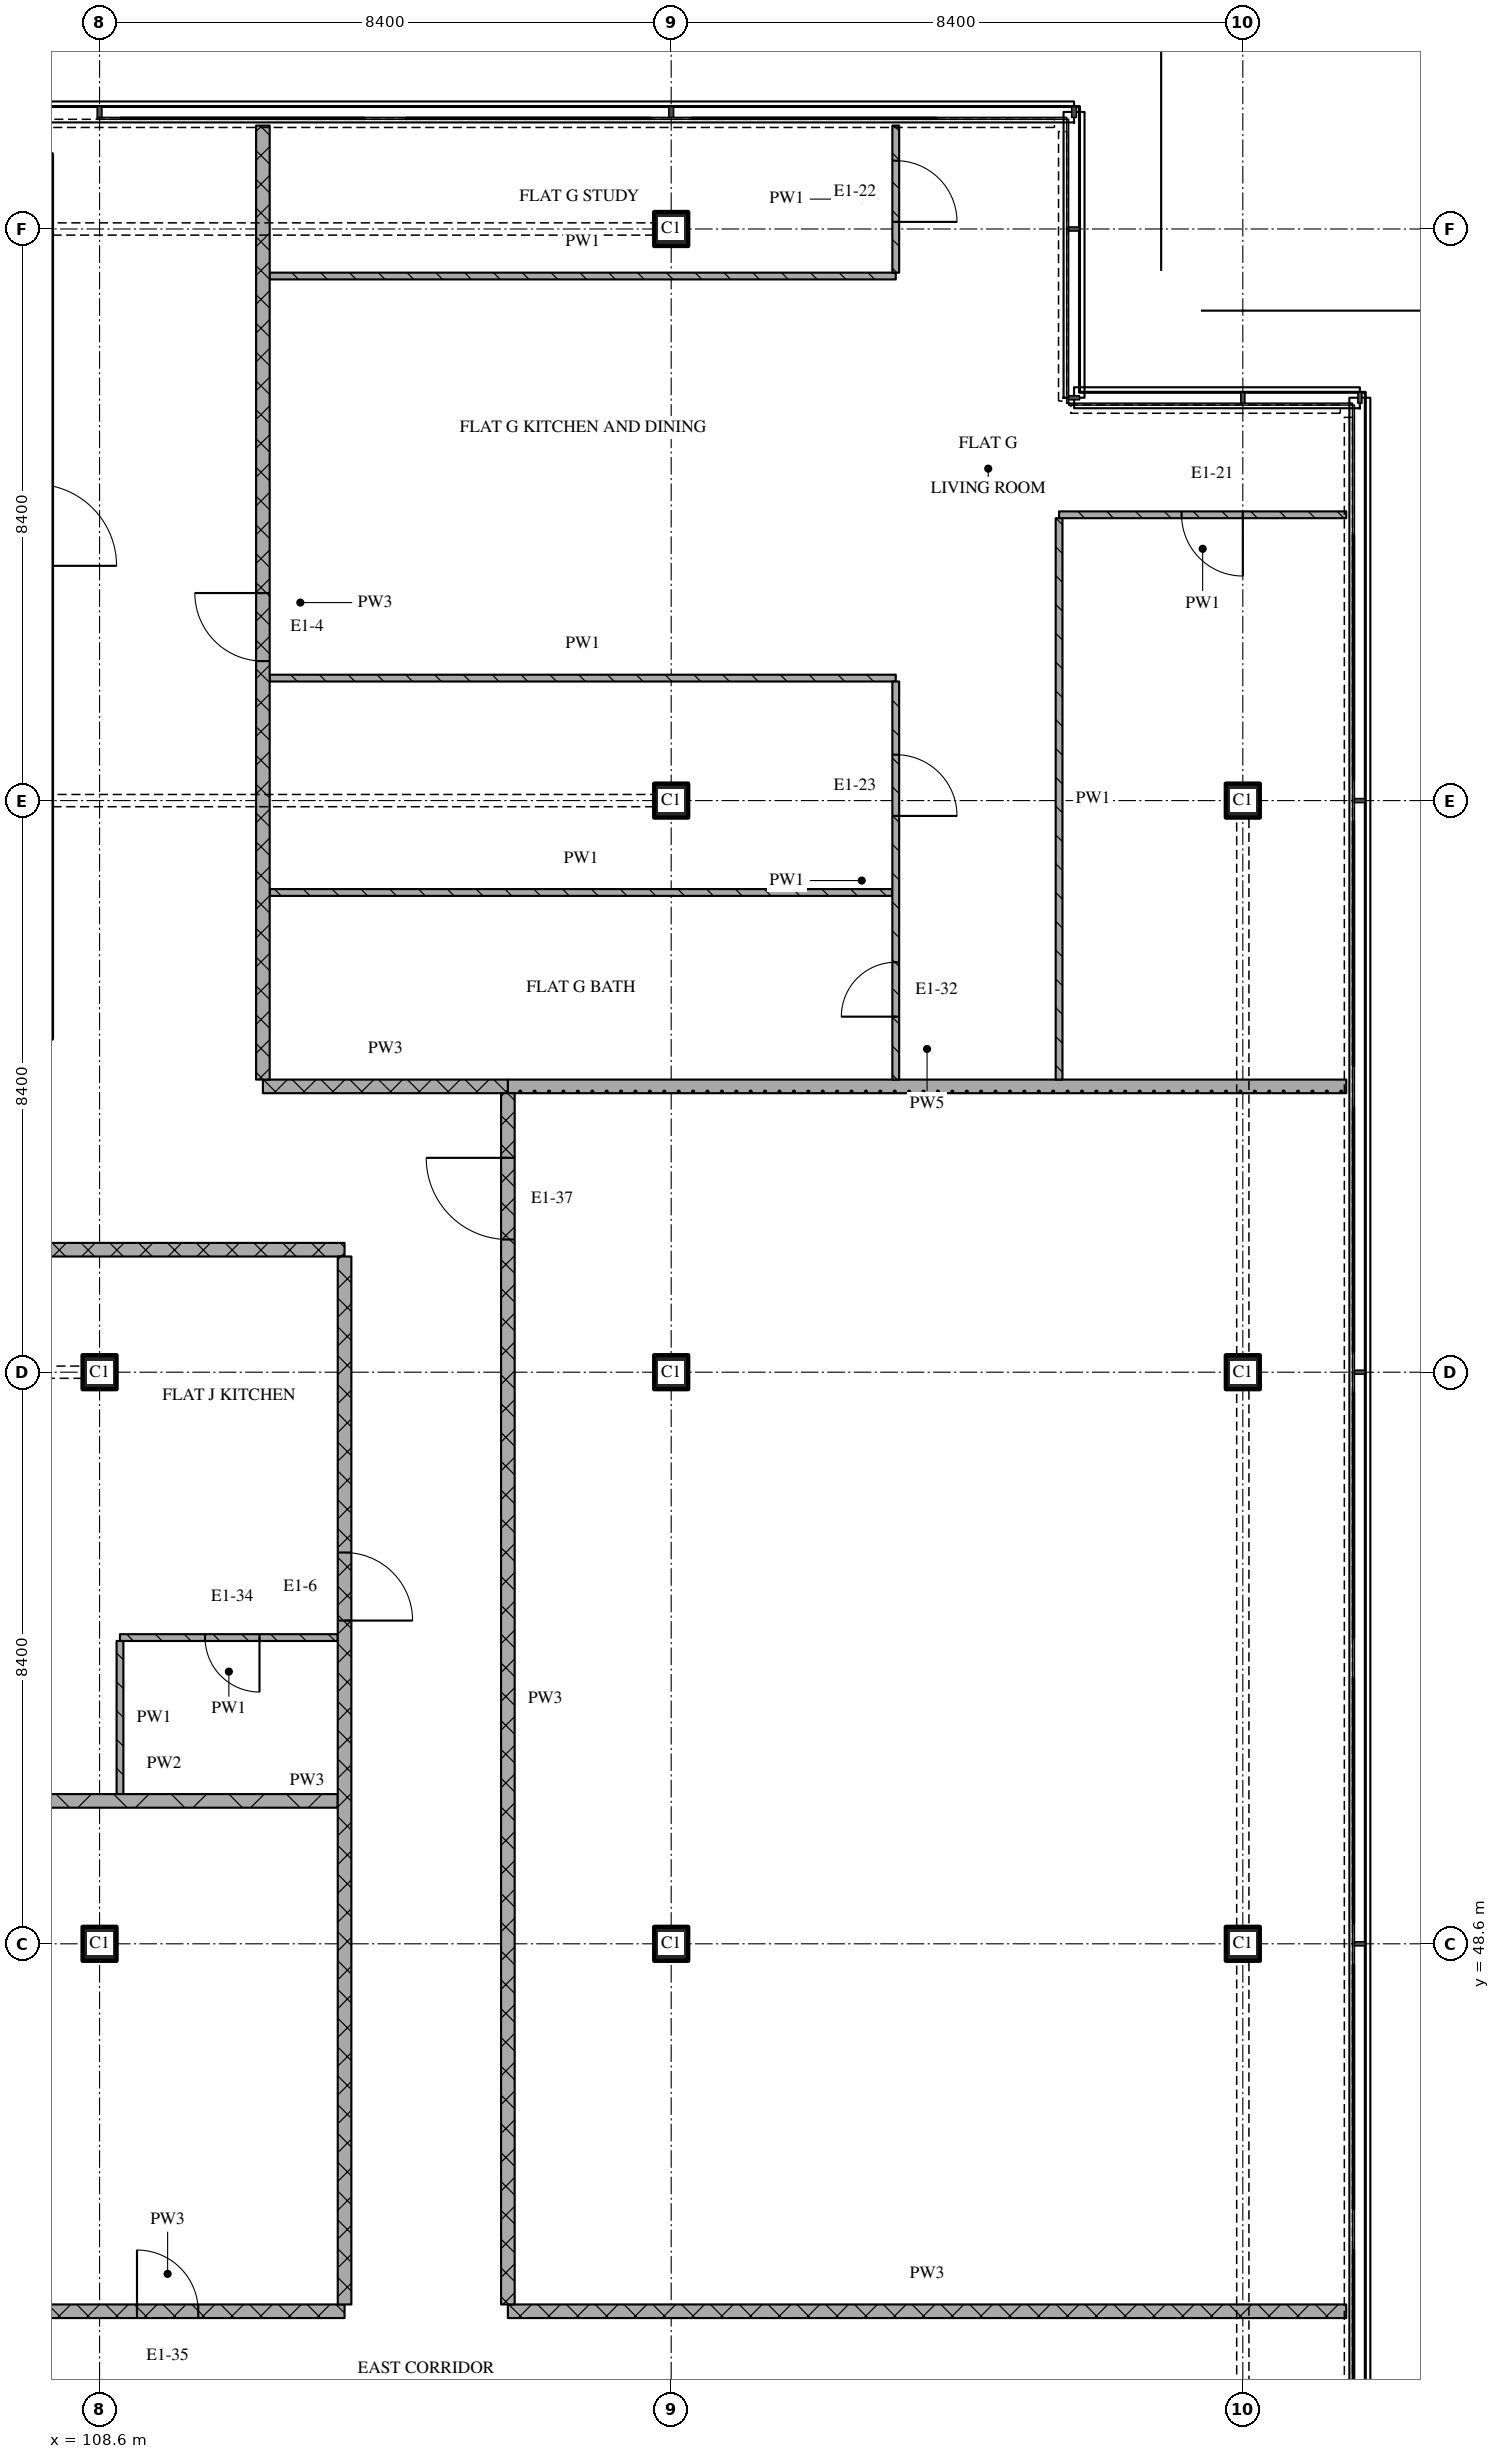
"""IFC4 building model, lengths in metres.
Left out: names, types, materials, properties, quantities, classifications, styles, units other than length and angle.
Written with IfcOpenShell. Run it as: python <this file> out.ifc"""

import sys

from ifc_helpers import new_model, si_unit, direction, frame, frame_2d, origin, origin_2d, place, context, subcontext, project, spatial, rectangle, extrude, element, fill, save


model = new_model("IFC4")
c1 = context("Model", 3, precision=1e-05, world=origin(), true_north=direction((0.0, 1.0)))
c2 = subcontext(c1, "Body", "Model", "MODEL_VIEW")
j1 = project(units=[si_unit("LENGTHUNIT", "METRE"), si_unit("PLANEANGLEUNIT", "RADIAN")], contexts=[c1])
p1 = place(None, origin())
s1 = spatial("IfcSite", under=j1, at=p1, CompositionType="ELEMENT")
p2 = place(p1, origin())
s2 = spatial("IfcBuilding", under=s1, at=p2, CompositionType="ELEMENT")
p3 = place(p2, frame((0.0, 0.0, 267.15)))
s3 = spatial("IfcBuildingStorey", under=s2, at=p3, CompositionType="ELEMENT", Elevation=267.15)
for number, where, z_axis, x_axis in (
    (1, (108.6, 48.6, 0.0), (0.0, 0.0, 1.0), (1.0, 0.0, 0.0)),
    (2, (108.6, 57.0, 0.0), (0.0, 0.0, 1.0), (1.0, 0.0, 0.0)),
    (3, (117.0, 48.6, 0.0), (0.0, 0.0, 1.0), (1.0, 0.0, 0.0)),
    (4, (117.0, 57.0, 0.0), (0.0, 0.0, 1.0), (1.0, 0.0, 0.0)),
    (5, (117.0, 65.4, 0.0), (0.0, 0.0, 1.0), (1.0, 0.0, 0.0)),
    (6, (117.0, 73.8, 0.0), (0.0, 0.0, 1.0), (1.0, 0.0, 0.0)),
    (7, (125.4, 48.6, 0.0), (0.0, 0.0, 1.0), (1.0, 0.0, 0.0)),
    (8, (125.4, 57.0, 0.0), (0.0, 0.0, 1.0), (1.0, 0.0, 0.0)),
    (9, (125.4, 65.4, 0.0), (0.0, 0.0, 1.0), (1.0, 0.0, 0.0)),
):
    element("IfcColumn", number, at=place(p3, frame(where, z_axis=z_axis, x_axis=x_axis)), inside=s3, PredefinedType="COLUMN", context=c2, shape_type="SweptSolid", body=[
        extrude(rectangle(XDim=0.5, YDim=0.5, at=origin_2d()), origin(), (0.0, 0.0, 1.0), 3.6),
    ])
p4 = place(p3, frame((107.0, 43.2, 0.0), z_axis=(0.0, 0.0, 1.0), x_axis=(1.0, 0.0, 0.0)))
e10 = element("IfcWall", 10, at=p4, inside=s3, PredefinedType="PARTITIONING", context=c2, shape_type="SweptSolid", body=[
    extrude(rectangle(XDim=5.2, YDim=0.2, at=frame_2d((2.6, 0.0))), origin(), (0.0, 0.0, 1.0), 3.32),
])
p5 = place(p4, frame((2.15, 0.0, 0.0)))
e11 = element("IfcOpeningElement", 11, at=p5, cuts=e10, PredefinedType="OPENING", context=c2, shape_type="SweptSolid", body=[
    extrude(rectangle(XDim=0.9, YDim=2.1, at=frame_2d((0.45, 1.05))), frame((0.0, 0.11, 0.0), z_axis=(0.0, -1.0, 0.0), x_axis=(1.0, 0.0, 0.0)), (0.0, 0.0, 1.0), 0.22),
])
p6 = place(p3, frame((114.6, 43.2, 0.0), z_axis=(0.0, 0.0, 1.0), x_axis=(1.0, 0.0, 0.0)))
e12 = element("IfcWall", 12, at=p6, inside=s3, PredefinedType="PARTITIONING", context=c2, shape_type="SweptSolid", body=[
    extrude(rectangle(XDim=12.32, YDim=0.2, at=frame_2d((6.16, 0.0))), origin(), (0.0, 0.0, 1.0), 3.32),
])
p7 = place(p3, frame((107.0, 50.7, 0.0), z_axis=(0.0, 0.0, 1.0), x_axis=(1.0, 0.0, 0.0)))
e13 = element("IfcWall", 13, at=p7, inside=s3, PredefinedType="PARTITIONING", context=c2, shape_type="SweptSolid", body=[
    extrude(rectangle(XDim=5.1, YDim=0.2, at=frame_2d((2.55, 0.0))), origin(), (0.0, 0.0, 1.0), 3.32),
])
p8 = place(p3, frame((112.1, 53.1, 0.0), z_axis=(0.0, 0.0, 1.0), x_axis=(-1.0, 0.0, 0.0)))
e14 = element("IfcWall", 14, at=p8, inside=s3, PredefinedType="PARTITIONING", context=c2, shape_type="SweptSolid", body=[
    extrude(rectangle(XDim=3.2, YDim=0.1, at=frame_2d((1.6, 0.0))), origin(), (0.0, 0.0, 1.0), 3.32),
])
p9 = place(p8, frame((1.15, 0.0, 0.0)))
e15 = element("IfcOpeningElement", 15, at=p9, cuts=e14, PredefinedType="OPENING", context=c2, shape_type="SweptSolid", body=[
    extrude(rectangle(XDim=0.8, YDim=2.1, at=frame_2d((0.4, 1.05))), frame((0.0, 0.06, 0.0), z_axis=(0.0, -1.0, 0.0), x_axis=(1.0, 0.0, 0.0)), (0.0, 0.0, 1.0), 0.12),
])
p10 = place(p3, frame((101.4, 58.8, 0.0), z_axis=(0.0, 0.0, 1.0), x_axis=(1.0, 0.0, 0.0)))
e16 = element("IfcWall", 16, at=p10, inside=s3, PredefinedType="PARTITIONING", context=c2, shape_type="SweptSolid", body=[
    extrude(rectangle(XDim=10.8, YDim=0.2, at=frame_2d((5.4, 0.0))), origin(), (0.0, 0.0, 1.0), 3.32),
])
p11 = place(p3, frame((111.0, 61.2, 0.0), z_axis=(0.0, 0.0, 1.0), x_axis=(1.0, 0.0, 0.0)))
e17 = element("IfcWall", 17, at=p11, inside=s3, PredefinedType="PARTITIONING", context=c2, shape_type="SweptSolid", body=[
    extrude(rectangle(XDim=3.6, YDim=0.2, at=frame_2d((1.8, 0.0))), origin(), (0.0, 0.0, 1.0), 3.32),
])
p12 = place(p3, frame((114.6, 61.2, 0.0), z_axis=(0.0, 0.0, 1.0), x_axis=(1.0, 0.0, 0.0)))
e18 = element("IfcWall", 18, at=p12, inside=s3, PredefinedType="PARTITIONING", context=c2, shape_type="SweptSolid", body=[
    extrude(rectangle(XDim=12.32, YDim=0.2, at=frame_2d((6.16, 0.0))), origin(), (0.0, 0.0, 1.0), 3.32),
])
p13 = place(p3, frame((111.1, 64.05, 0.0), z_axis=(0.0, 0.0, 1.0), x_axis=(1.0, 0.0, 0.0)))
e19 = element("IfcWall", 19, at=p13, inside=s3, PredefinedType="PARTITIONING", context=c2, shape_type="SweptSolid", body=[
    extrude(rectangle(XDim=9.15, YDim=0.1, at=frame_2d((4.575, 0.0))), origin(), (0.0, 0.0, 1.0), 3.32),
])
p14 = place(p3, frame((111.1, 67.2, 0.0), z_axis=(0.0, 0.0, 1.0), x_axis=(1.0, 0.0, 0.0)))
e20 = element("IfcWall", 20, at=p14, inside=s3, PredefinedType="PARTITIONING", context=c2, shape_type="SweptSolid", body=[
    extrude(rectangle(XDim=9.2, YDim=0.1, at=frame_2d((4.6, 0.0))), origin(), (0.0, 0.0, 1.0), 3.32),
])
p15 = place(p3, frame((126.92, 69.6, 0.0), z_axis=(0.0, 0.0, 1.0), x_axis=(-1.0, 0.0, 0.0)))
e21 = element("IfcWall", 21, at=p15, inside=s3, PredefinedType="PARTITIONING", context=c2, shape_type="SweptSolid", body=[
    extrude(rectangle(XDim=4.22, YDim=0.1, at=frame_2d((2.11, 0.0))), origin(), (0.0, 0.0, 1.0), 3.32),
])
p16 = place(p15, frame((1.52, 0.0, 0.0)))
e22 = element("IfcOpeningElement", 22, at=p16, cuts=e21, PredefinedType="OPENING", context=c2, shape_type="SweptSolid", body=[
    extrude(rectangle(XDim=0.9, YDim=2.1, at=frame_2d((0.45, 1.05))), frame((0.0, 0.06, 0.0), z_axis=(0.0, -1.0, 0.0), x_axis=(1.0, 0.0, 0.0)), (0.0, 0.0, 1.0), 0.12),
])
p17 = place(p3, frame((111.1, 73.109, 0.0), z_axis=(0.0, 0.0, 1.0), x_axis=(1.0, 0.0, 0.0)))
e23 = element("IfcWall", 23, at=p17, inside=s3, PredefinedType="PARTITIONING", context=c2, shape_type="SweptSolid", body=[
    extrude(rectangle(XDim=9.2, YDim=0.1, at=frame_2d((4.6, 0.0))), origin(), (0.0, 0.0, 1.0), 3.32),
])
p18 = place(p3, frame((108.9, 53.05, 0.0), z_axis=(0.0, 0.0, 1.0), x_axis=(0.0, -1.0, 0.0)))
e24 = element("IfcWall", 24, at=p18, inside=s3, PredefinedType="PARTITIONING", context=c2, shape_type="SweptSolid", body=[
    extrude(rectangle(XDim=2.25, YDim=0.1, at=frame_2d((1.125, 0.0))), origin(), (0.0, 0.0, 1.0), 3.32),
])
p19 = place(p3, frame((111.0, 75.32, 0.0), z_axis=(0.0, 0.0, 1.0), x_axis=(0.0, -1.0, 0.0)))
e25 = element("IfcWall", 25, at=p19, inside=s3, PredefinedType="PARTITIONING", context=c2, shape_type="SweptSolid", body=[
    extrude(rectangle(XDim=14.02, YDim=0.2, at=frame_2d((7.01, 0.0))), origin(), (0.0, 0.0, 1.0), 3.32),
])
p20 = place(p19, frame((6.87, 0.0, 0.0)))
e26 = element("IfcOpeningElement", 26, at=p20, cuts=e25, PredefinedType="OPENING", context=c2, shape_type="SweptSolid", body=[
    extrude(rectangle(XDim=1.0, YDim=2.1, at=frame_2d((0.5, 1.05))), frame((0.0, 0.11, 0.0), z_axis=(0.0, -1.0, 0.0), x_axis=(1.0, 0.0, 0.0)), (0.0, 0.0, 1.0), 0.22),
])
p21 = place(p3, frame((112.2, 43.3, 0.0), z_axis=(0.0, 0.0, 1.0), x_axis=(0.0, 1.0, 0.0)))
e27 = element("IfcWall", 27, at=p21, inside=s3, PredefinedType="PARTITIONING", context=c2, shape_type="SweptSolid", body=[
    extrude(rectangle(XDim=15.4, YDim=0.2, at=frame_2d((7.7, 0.0))), origin(), (0.0, 0.0, 1.0), 3.32),
])
p22 = place(p21, frame((10.05, 0.0, 0.0)))
e28 = element("IfcOpeningElement", 28, at=p22, cuts=e27, PredefinedType="OPENING", context=c2, shape_type="SweptSolid", body=[
    extrude(rectangle(XDim=1.0, YDim=2.1, at=frame_2d((0.5, 1.05))), frame((0.0, 0.11, 0.0), z_axis=(0.0, -1.0, 0.0), x_axis=(1.0, 0.0, 0.0)), (0.0, 0.0, 1.0), 0.22),
])
p23 = place(p3, frame((114.6, 61.1, 0.0), z_axis=(0.0, 0.0, 1.0), x_axis=(0.0, -1.0, 0.0)))
e29 = element("IfcWall", 29, at=p23, inside=s3, PredefinedType="PARTITIONING", context=c2, shape_type="SweptSolid", body=[
    extrude(rectangle(XDim=17.8, YDim=0.2, at=frame_2d((8.9, 0.0))), origin(), (0.0, 0.0, 1.0), 3.32),
])
p24 = place(p23, frame((0.95, 0.0, 0.0)))
e30 = element("IfcOpeningElement", 30, at=p24, cuts=e29, PredefinedType="OPENING", context=c2, shape_type="SweptSolid", body=[
    extrude(rectangle(XDim=1.2, YDim=2.1, at=frame_2d((0.6, 1.05))), frame((0.0, 0.11, 0.0), z_axis=(0.0, -1.0, 0.0), x_axis=(1.0, 0.0, 0.0)), (0.0, 0.0, 1.0), 0.22),
])
p25 = place(p3, frame((120.3, 61.3, 0.0), z_axis=(0.0, 0.0, 1.0), x_axis=(0.0, 1.0, 0.0)))
e31 = element("IfcWall", 31, at=p25, inside=s3, PredefinedType="PARTITIONING", context=c2, shape_type="SweptSolid", body=[
    extrude(rectangle(XDim=5.85, YDim=0.1, at=frame_2d((2.925, 0.0))), origin(), (0.0, 0.0, 1.0), 3.32),
])
p26 = place(p25, frame((0.925, 0.0, 0.0)))
e32 = element("IfcOpeningElement", 32, at=p26, cuts=e31, PredefinedType="OPENING", context=c2, shape_type="SweptSolid", body=[
    extrude(rectangle(XDim=0.8, YDim=2.1, at=frame_2d((0.4, 1.05))), frame((0.0, 0.06, 0.0), z_axis=(0.0, -1.0, 0.0), x_axis=(1.0, 0.0, 0.0)), (0.0, 0.0, 1.0), 0.12),
])
p27 = place(p25, frame((3.875, 0.0, 0.0)))
e33 = element("IfcOpeningElement", 33, at=p27, cuts=e31, PredefinedType="OPENING", context=c2, shape_type="SweptSolid", body=[
    extrude(rectangle(XDim=0.9, YDim=2.1, at=frame_2d((0.45, 1.05))), frame((0.0, 0.06, 0.0), z_axis=(0.0, -1.0, 0.0), x_axis=(1.0, 0.0, 0.0)), (0.0, 0.0, 1.0), 0.12),
])
p28 = place(p3, frame((120.3, 73.159, 0.0), z_axis=(0.0, 0.0, 1.0), x_axis=(0.0, 1.0, 0.0)))
e34 = element("IfcWall", 34, at=p28, inside=s3, PredefinedType="PARTITIONING", context=c2, shape_type="SweptSolid", body=[
    extrude(rectangle(XDim=2.161, YDim=0.1, at=frame_2d((1.081, 0.0))), origin(), (0.0, 0.0, 1.0), 3.32),
])
p29 = place(p28, frame((0.746, 0.0, 0.0)))
e35 = element("IfcOpeningElement", 35, at=p29, cuts=e34, PredefinedType="OPENING", context=c2, shape_type="SweptSolid", body=[
    extrude(rectangle(XDim=0.9, YDim=2.1, at=frame_2d((0.45, 1.05))), frame((0.0, 0.06, 0.0), z_axis=(0.0, -1.0, 0.0), x_axis=(1.0, 0.0, 0.0)), (0.0, 0.0, 1.0), 0.12),
])
p30 = place(p3, frame((122.7, 69.55, 0.0), z_axis=(0.0, 0.0, 1.0), x_axis=(0.0, -1.0, 0.0)))
e36 = element("IfcWall", 36, at=p30, inside=s3, PredefinedType="PARTITIONING", context=c2, shape_type="SweptSolid", body=[
    extrude(rectangle(XDim=8.25, YDim=0.1, at=frame_2d((4.125, 0.0))), origin(), (0.0, 0.0, 1.0), 3.32),
])
p31 = place(p5, origin())
e37 = element("IfcDoor", 37, at=p31, inside=s3, OperationType="SINGLE_SWING_LEFT", PredefinedType="DOOR", context=c2, shape_type="SweptSolid", body=[
    extrude(rectangle(XDim=0.9, YDim=2.1, at=frame_2d((0.45, 1.05))), frame((0.0, 0.025, 0.0), z_axis=(0.0, -1.0, 0.0), x_axis=(1.0, 0.0, 0.0)), (0.0, 0.0, 1.0), 0.05),
])
fill(e11, e37)
p32 = place(p9, origin())
e38 = element("IfcDoor", 38, at=p32, inside=s3, OperationType="SINGLE_SWING_LEFT", PredefinedType="DOOR", context=c2, shape_type="SweptSolid", body=[
    extrude(rectangle(XDim=0.8, YDim=2.1, at=frame_2d((0.4, 1.05))), frame((0.0, 0.025, 0.0), z_axis=(0.0, -1.0, 0.0), x_axis=(1.0, 0.0, 0.0)), (0.0, 0.0, 1.0), 0.05),
])
fill(e15, e38)
p33 = place(p16, origin())
e39 = element("IfcDoor", 39, at=p33, inside=s3, OperationType="SINGLE_SWING_LEFT", PredefinedType="DOOR", context=c2, shape_type="SweptSolid", body=[
    extrude(rectangle(XDim=0.9, YDim=2.1, at=frame_2d((0.45, 1.05))), frame((0.0, 0.025, 0.0), z_axis=(0.0, -1.0, 0.0), x_axis=(1.0, 0.0, 0.0)), (0.0, 0.0, 1.0), 0.05),
])
fill(e22, e39)
p34 = place(p20, origin())
e40 = element("IfcDoor", 40, at=p34, inside=s3, OperationType="SINGLE_SWING_RIGHT", PredefinedType="DOOR", context=c2, shape_type="SweptSolid", body=[
    extrude(rectangle(XDim=1.0, YDim=2.1, at=frame_2d((0.5, 1.05))), frame((0.0, 0.025, 0.0), z_axis=(0.0, -1.0, 0.0), x_axis=(1.0, 0.0, 0.0)), (0.0, 0.0, 1.0), 0.05),
])
fill(e26, e40)
p35 = place(p22, origin())
e41 = element("IfcDoor", 41, at=p35, inside=s3, OperationType="SINGLE_SWING_RIGHT", PredefinedType="DOOR", context=c2, shape_type="SweptSolid", body=[
    extrude(rectangle(XDim=1.0, YDim=2.1, at=frame_2d((0.5, 1.05))), frame((0.0, 0.025, 0.0), z_axis=(0.0, -1.0, 0.0), x_axis=(1.0, 0.0, 0.0)), (0.0, 0.0, 1.0), 0.05),
])
fill(e28, e41)
p36 = place(p24, origin())
e42 = element("IfcDoor", 42, at=p36, inside=s3, OperationType="SINGLE_SWING_RIGHT", PredefinedType="DOOR", context=c2, shape_type="SweptSolid", body=[
    extrude(rectangle(XDim=1.2, YDim=2.1, at=frame_2d((0.6, 1.05))), frame((0.0, 0.025, 0.0), z_axis=(0.0, -1.0, 0.0), x_axis=(1.0, 0.0, 0.0)), (0.0, 0.0, 1.0), 0.05),
])
fill(e30, e42)
p37 = place(p26, origin())
e43 = element("IfcDoor", 43, at=p37, inside=s3, OperationType="SINGLE_SWING_LEFT", PredefinedType="DOOR", context=c2, shape_type="SweptSolid", body=[
    extrude(rectangle(XDim=0.8, YDim=2.1, at=frame_2d((0.4, 1.05))), frame((0.0, 0.025, 0.0), z_axis=(0.0, -1.0, 0.0), x_axis=(1.0, 0.0, 0.0)), (0.0, 0.0, 1.0), 0.05),
])
fill(e32, e43)
p38 = place(p27, origin())
e44 = element("IfcDoor", 44, at=p38, inside=s3, OperationType="SINGLE_SWING_RIGHT", PredefinedType="DOOR", context=c2, shape_type="SweptSolid", body=[
    extrude(rectangle(XDim=0.9, YDim=2.1, at=frame_2d((0.45, 1.05))), frame((0.0, 0.025, 0.0), z_axis=(0.0, -1.0, 0.0), x_axis=(1.0, 0.0, 0.0)), (0.0, 0.0, 1.0), 0.05),
])
fill(e33, e44)
p39 = place(p29, origin())
e45 = element("IfcDoor", 45, at=p39, inside=s3, OperationType="SINGLE_SWING_RIGHT", PredefinedType="DOOR", context=c2, shape_type="SweptSolid", body=[
    extrude(rectangle(XDim=0.9, YDim=2.1, at=frame_2d((0.45, 1.05))), frame((0.0, 0.025, 0.0), z_axis=(0.0, -1.0, 0.0), x_axis=(1.0, 0.0, 0.0)), (0.0, 0.0, 1.0), 0.05),
])
fill(e35, e45)
save(model, sys.argv[1])
